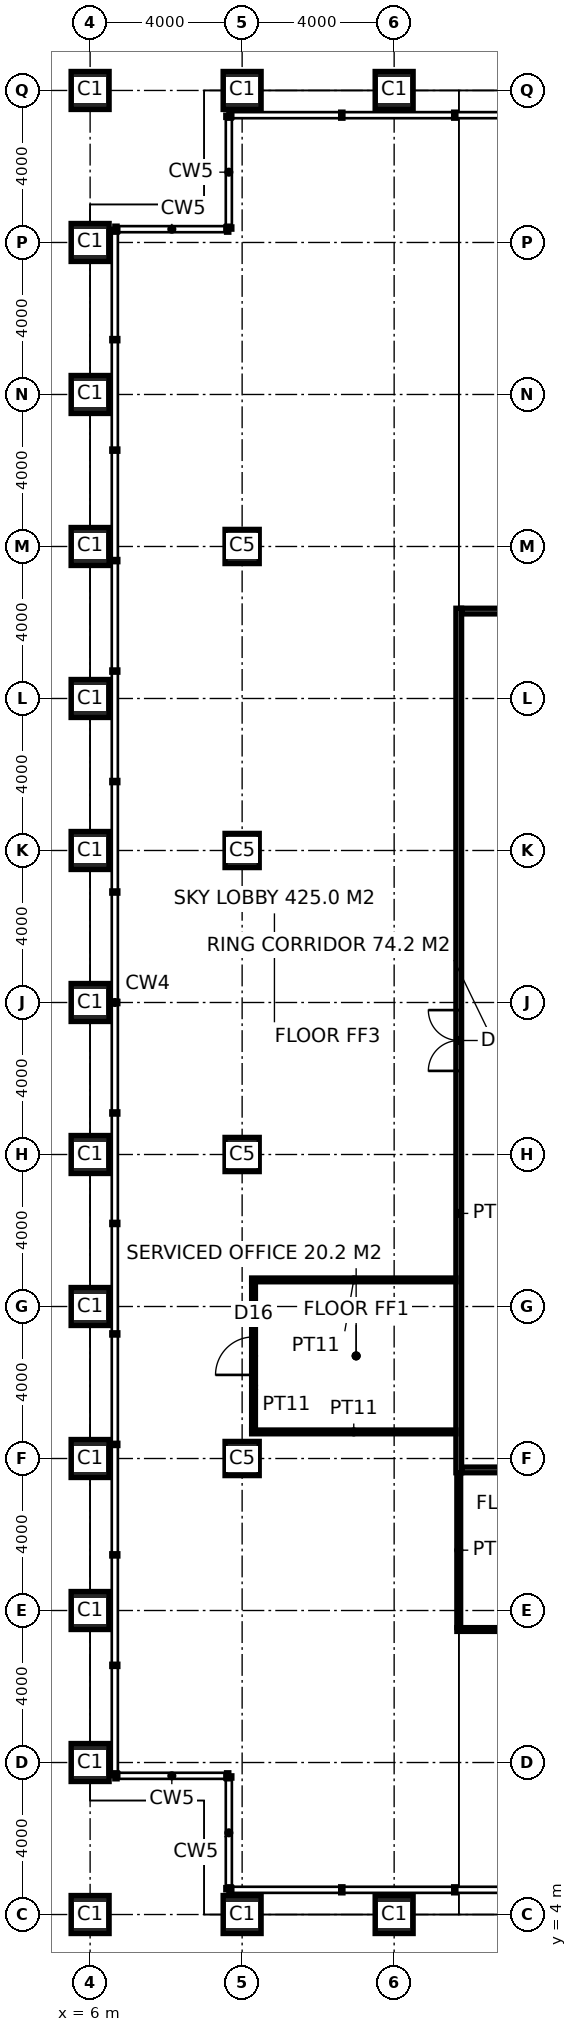
"""IFC4 building model, lengths in metres.
Left out: names, types, materials, properties, quantities, classifications, styles, units other than length and angle.
Written with IfcOpenShell. Run it as: python <this file> out.ifc"""

import sys

from ifc_helpers import new_model, si_unit, direction, frame, frame_2d, origin, origin_2d, place, context, subcontext, project, spatial, rectangle, hollow_rectangle, extrude, element, fill, save


model = new_model("IFC4")
c1 = context("Model", 3, precision=1e-05, world=origin(), true_north=direction((0.0, 1.0)))
c2 = subcontext(c1, "Body", "Model", "MODEL_VIEW")
j1 = project(units=[si_unit("LENGTHUNIT", "METRE"), si_unit("PLANEANGLEUNIT", "RADIAN")], contexts=[c1])
p1 = place(None, origin())
s1 = spatial("IfcSite", under=j1, at=p1, CompositionType="ELEMENT")
p2 = place(p1, origin())
s2 = spatial("IfcBuilding", under=s1, at=p2, CompositionType="ELEMENT")
p3 = place(p2, frame((0.0, 0.0, 142.8)))
s3 = spatial("IfcBuildingStorey", under=s2, at=p3, CompositionType="ELEMENT", Elevation=142.8)
for number, where, z_axis, x_axis in (
    (1, (6.0, 4.0, 0.0), (0.0, 0.0, 1.0), (1.0, 0.0, 0.0)),
    (2, (6.0, 8.0, 0.0), (0.0, 0.0, 1.0), (1.0, 0.0, 0.0)),
    (3, (6.0, 12.0, 0.0), (0.0, 0.0, 1.0), (1.0, 0.0, 0.0)),
    (4, (6.0, 16.0, 0.0), (0.0, 0.0, 1.0), (1.0, 0.0, 0.0)),
    (5, (6.0, 20.0, 0.0), (0.0, 0.0, 1.0), (1.0, 0.0, 0.0)),
    (6, (6.0, 24.0, 0.0), (0.0, 0.0, 1.0), (1.0, 0.0, 0.0)),
    (7, (6.0, 28.0, 0.0), (0.0, 0.0, 1.0), (1.0, 0.0, 0.0)),
    (8, (6.0, 32.0, 0.0), (0.0, 0.0, 1.0), (1.0, 0.0, 0.0)),
    (9, (6.0, 36.0, 0.0), (0.0, 0.0, 1.0), (1.0, 0.0, 0.0)),
    (10, (6.0, 40.0, 0.0), (0.0, 0.0, 1.0), (1.0, 0.0, 0.0)),
    (11, (6.0, 44.0, 0.0), (0.0, 0.0, 1.0), (1.0, 0.0, 0.0)),
    (12, (6.0, 48.0, 0.0), (0.0, 0.0, 1.0), (1.0, 0.0, 0.0)),
    (13, (6.0, 52.0, 0.0), (0.0, 0.0, 1.0), (1.0, 0.0, 0.0)),
    (14, (10.0, 4.0, 0.0), (0.0, 0.0, 1.0), (1.0, 0.0, 0.0)),
    (15, (10.0, 52.0, 0.0), (0.0, 0.0, 1.0), (1.0, 0.0, 0.0)),
    (16, (14.0, 4.0, 0.0), (0.0, 0.0, 1.0), (1.0, 0.0, 0.0)),
    (17, (14.0, 52.0, 0.0), (0.0, 0.0, 1.0), (1.0, 0.0, 0.0)),
):
    element("IfcColumn", number, at=place(p3, frame(where, z_axis=z_axis, x_axis=x_axis)), inside=s3, PredefinedType="COLUMN", context=c2, shape_type="SweptSolid", body=[
        extrude(hollow_rectangle(XDim=1.0, YDim=1.0, WallThickness=0.1, at=origin_2d()), origin(), (0.0, 0.0, 1.0), 5.0),
    ])
for number, where, z_axis, x_axis in (
    (18, (10.0, 16.0, 0.0), (0.0, 0.0, 1.0), (1.0, 0.0, 0.0)),
    (19, (10.0, 24.0, 0.0), (0.0, 0.0, 1.0), (1.0, 0.0, 0.0)),
    (20, (10.0, 32.0, 0.0), (0.0, 0.0, 1.0), (1.0, 0.0, 0.0)),
    (21, (10.0, 40.0, 0.0), (0.0, 0.0, 1.0), (1.0, 0.0, 0.0)),
):
    element("IfcColumn", number, at=place(p3, frame(where, z_axis=z_axis, x_axis=x_axis)), inside=s3, PredefinedType="COLUMN", context=c2, shape_type="SweptSolid", body=[
        extrude(hollow_rectangle(XDim=0.9, YDim=0.9, WallThickness=0.1, at=origin_2d()), origin(), (0.0, 0.0, 1.0), 5.0),
    ])
p4 = place(p3, frame((15.7, 15.625, 0.0), z_axis=(0.0, 0.0, 1.0), x_axis=(0.0, 1.0, 0.0)))
e22 = element("IfcWall", 22, at=p4, inside=s3, PredefinedType="PARTITIONING", context=c2, shape_type="SweptSolid", body=[
    extrude(rectangle(XDim=22.75, YDim=0.15, at=frame_2d((11.375, 0.0))), origin(), (0.0, 0.0, 1.0), 4.85),
])
p5 = place(p4, frame((10.575, 0.0, 0.0)))
e23 = element("IfcOpeningElement", 23, at=p5, cuts=e22, PredefinedType="OPENING", context=c2, shape_type="SweptSolid", body=[
    extrude(rectangle(XDim=1.6, YDim=2.7, at=frame_2d((0.8, 1.35))), frame((0.0, 0.085, 0.0), z_axis=(0.0, -1.0, 0.0), x_axis=(1.0, 0.0, 0.0)), (0.0, 0.0, 1.0), 0.17),
])
p6 = place(p3, frame((15.775, 15.7, 0.0), z_axis=(0.0, 0.0, 1.0), x_axis=(1.0, 0.0, 0.0)))
e24 = element("IfcWall", 24, at=p6, inside=s3, PredefinedType="PARTITIONING", context=c2, shape_type="SweptSolid", body=[
    extrude(rectangle(XDim=22.05, YDim=0.15, at=frame_2d((11.025, 0.0))), origin(), (0.0, 0.0, 1.0), 4.85),
])
p7 = place(p3, frame((15.775, 38.3, 0.0), z_axis=(0.0, 0.0, 1.0), x_axis=(1.0, 0.0, 0.0)))
e25 = element("IfcWall", 25, at=p7, inside=s3, PredefinedType="PARTITIONING", context=c2, shape_type="SweptSolid", body=[
    extrude(rectangle(XDim=22.05, YDim=0.15, at=frame_2d((11.025, 0.0))), origin(), (0.0, 0.0, 1.0), 4.85),
])
p8 = place(p7, frame((7.975, 0.0, 0.0)))
e26 = element("IfcOpeningElement", 26, at=p8, cuts=e25, PredefinedType="OPENING", context=c2, shape_type="SweptSolid", body=[
    extrude(rectangle(XDim=0.9, YDim=2.1, at=frame_2d((0.45, 1.05))), frame((0.0, 0.085, 0.0), z_axis=(0.0, -1.0, 0.0), x_axis=(1.0, 0.0, 0.0)), (0.0, 0.0, 1.0), 0.17),
])
p9 = place(p7, frame((11.725, 0.0, 0.0)))
e27 = element("IfcOpeningElement", 27, at=p9, cuts=e25, PredefinedType="OPENING", context=c2, shape_type="SweptSolid", body=[
    extrude(rectangle(XDim=1.0, YDim=2.1, at=frame_2d((0.5, 1.05))), frame((0.0, 0.085, 0.0), z_axis=(0.0, -1.0, 0.0), x_axis=(1.0, 0.0, 0.0)), (0.0, 0.0, 1.0), 0.17),
])
p10 = place(p7, frame((15.575, 0.0, 0.0)))
e28 = element("IfcOpeningElement", 28, at=p10, cuts=e25, PredefinedType="OPENING", context=c2, shape_type="SweptSolid", body=[
    extrude(rectangle(XDim=0.9, YDim=2.1, at=frame_2d((0.45, 1.05))), frame((0.0, 0.085, 0.0), z_axis=(0.0, -1.0, 0.0), x_axis=(1.0, 0.0, 0.0)), (0.0, 0.0, 1.0), 0.17),
])
p11 = place(p3, frame((15.65, 11.5, 0.0), z_axis=(0.0, 0.0, 1.0), x_axis=(1.0, 0.0, 0.0)))
e29 = element("IfcWall", 29, at=p11, inside=s3, PredefinedType="PARTITIONING", context=c2, shape_type="SweptSolid", body=[
    extrude(rectangle(XDim=9.85, YDim=0.1, at=frame_2d((4.925, 0.0))), origin(), (0.0, 0.0, 1.0), 4.85),
])
p12 = place(p11, frame((1.4, 0.0, 0.0)))
e30 = element("IfcOpeningElement", 30, at=p12, cuts=e29, PredefinedType="OPENING", context=c2, shape_type="SweptSolid", body=[
    extrude(rectangle(XDim=1.0, YDim=2.2, at=frame_2d((0.5, 1.1))), frame((0.0, 0.06, 0.0), z_axis=(0.0, -1.0, 0.0), x_axis=(1.0, 0.0, 0.0)), (0.0, 0.0, 1.0), 0.12),
])
p13 = place(p11, frame((4.95, 0.0, 0.0)))
e31 = element("IfcOpeningElement", 31, at=p13, cuts=e29, PredefinedType="OPENING", context=c2, shape_type="SweptSolid", body=[
    extrude(rectangle(XDim=1.0, YDim=2.2, at=frame_2d((0.5, 1.1))), frame((0.0, 0.06, 0.0), z_axis=(0.0, -1.0, 0.0), x_axis=(1.0, 0.0, 0.0)), (0.0, 0.0, 1.0), 0.12),
])
p14 = place(p11, frame((7.975, 0.0, 0.0)))
e32 = element("IfcOpeningElement", 32, at=p14, cuts=e29, PredefinedType="OPENING", context=c2, shape_type="SweptSolid", body=[
    extrude(rectangle(XDim=1.0, YDim=2.2, at=frame_2d((0.5, 1.1))), frame((0.0, 0.06, 0.0), z_axis=(0.0, -1.0, 0.0), x_axis=(1.0, 0.0, 0.0)), (0.0, 0.0, 1.0), 0.12),
])
for number, where, z_axis, x_axis in (
    (33, (10.25, 16.7, 0.0), (0.0, 0.0, 1.0), (1.0, 0.0, 0.0)),
    (34, (10.25, 20.7, 0.0), (0.0, 0.0, 1.0), (1.0, 0.0, 0.0)),
):
    element("IfcWall", number, at=place(p3, frame(where, z_axis=z_axis, x_axis=x_axis)), inside=s3, PredefinedType="PARTITIONING", context=c2, shape_type="SweptSolid", body=[
        extrude(rectangle(XDim=5.375, YDim=0.1, at=frame_2d((2.688, 0.0))), origin(), (0.0, 0.0, 1.0), 4.85),
    ])
p15 = place(p3, frame((10.3, 16.75, 0.0), z_axis=(0.0, 0.0, 1.0), x_axis=(0.0, 1.0, 0.0)))
e35 = element("IfcWall", 35, at=p15, inside=s3, PredefinedType="PARTITIONING", context=c2, shape_type="SweptSolid", body=[
    extrude(rectangle(XDim=3.9, YDim=0.1, at=frame_2d((1.95, 0.0))), origin(), (0.0, 0.0, 1.0), 3.95),
])
p16 = place(p15, frame((1.45, 0.0, 0.0)))
e36 = element("IfcOpeningElement", 36, at=p16, cuts=e35, PredefinedType="OPENING", context=c2, shape_type="SweptSolid", body=[
    extrude(rectangle(XDim=1.0, YDim=2.2, at=frame_2d((0.5, 1.1))), frame((0.0, 0.06, 0.0), z_axis=(0.0, -1.0, 0.0), x_axis=(1.0, 0.0, 0.0)), (0.0, 0.0, 1.0), 0.12),
])
p17 = place(p3, frame((15.7, 11.55, 0.0), z_axis=(0.0, 0.0, 1.0), x_axis=(0.0, 1.0, 0.0)))
e37 = element("IfcWall", 37, at=p17, inside=s3, PredefinedType="PARTITIONING", context=c2, shape_type="SweptSolid", body=[
    extrude(rectangle(XDim=4.075, YDim=0.1, at=frame_2d((2.038, 0.0))), origin(), (0.0, 0.0, 1.0), 4.85),
])
p18 = place(p5, origin())
e38 = element("IfcDoor", 38, at=p18, inside=s3, OperationType="DOUBLE_DOOR_DOUBLE_SWING", PredefinedType="DOOR", context=c2, shape_type="SweptSolid", body=[
    extrude(rectangle(XDim=1.6, YDim=2.7, at=frame_2d((0.8, 1.35))), frame((0.0, 0.025, 0.0), z_axis=(0.0, -1.0, 0.0), x_axis=(1.0, 0.0, 0.0)), (0.0, 0.0, 1.0), 0.05),
])
fill(e23, e38)
p19 = place(p16, origin())
e39 = element("IfcDoor", 39, at=p19, inside=s3, OperationType="SINGLE_SWING_LEFT", PredefinedType="DOOR", context=c2, shape_type="SweptSolid", body=[
    extrude(rectangle(XDim=1.0, YDim=2.2, at=frame_2d((0.5, 1.1))), frame((0.0, 0.025, 0.0), z_axis=(0.0, -1.0, 0.0), x_axis=(1.0, 0.0, 0.0)), (0.0, 0.0, 1.0), 0.05),
])
fill(e36, e39)
save(model, sys.argv[1])
